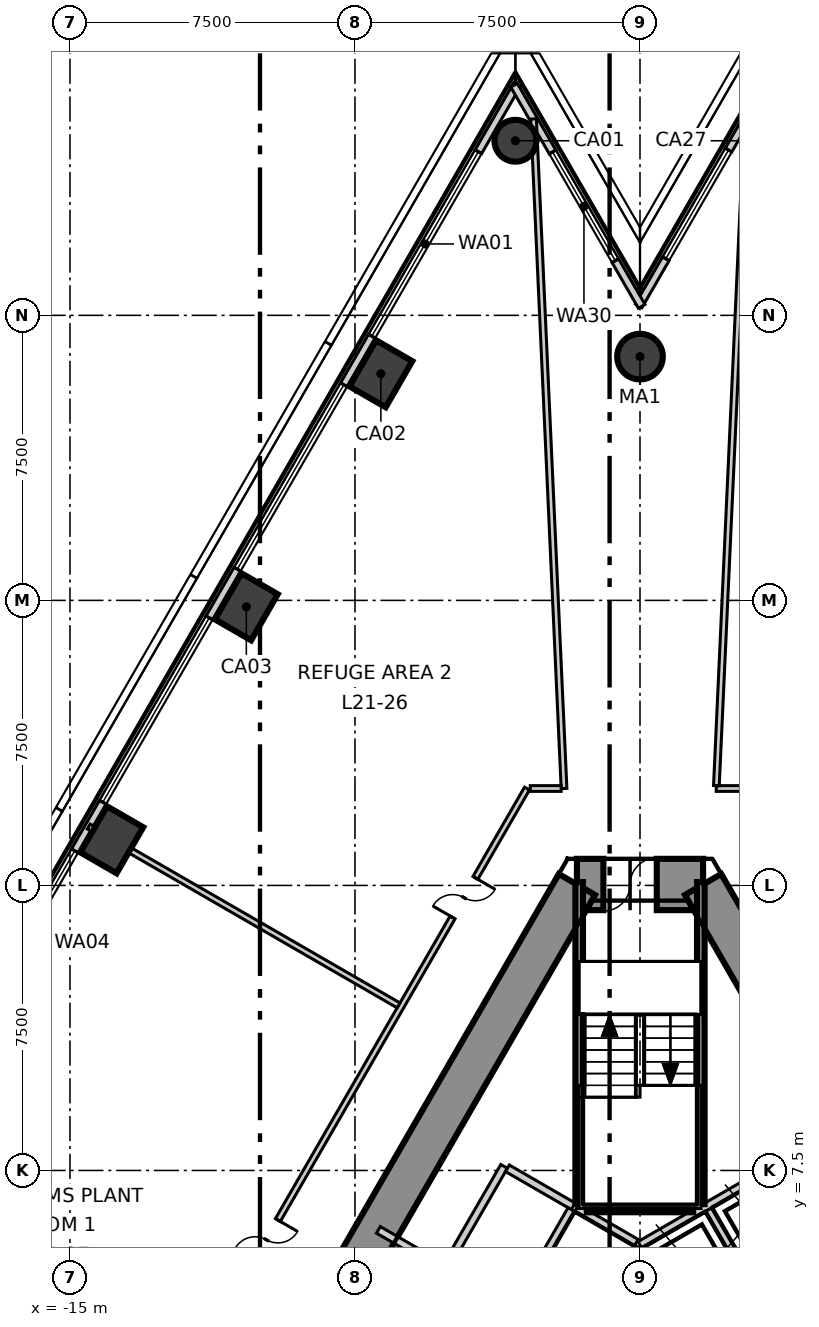
"""IFC4 building model, lengths in metres.
Left out: names, types, materials, properties, quantities, classifications, styles, units other than length and angle.
Written with IfcOpenShell. Run it as: python <this file> out.ifc"""

import sys

from ifc_helpers import new_model, si_unit, direction, frame, frame_2d, origin, origin_2d, place, context, subcontext, project, spatial, polyline, rectangle, circle, outline, extrude, element, fill, save


model = new_model("IFC4")
c1 = context("Model", 3, precision=1e-05, world=origin(), true_north=direction((0.0, 1.0)))
c2 = subcontext(c1, "Body", "Model", "MODEL_VIEW")
j1 = project(units=[si_unit("LENGTHUNIT", "METRE"), si_unit("PLANEANGLEUNIT", "RADIAN")], contexts=[c1])
p1 = place(None, origin())
s1 = spatial("IfcSite", under=j1, at=p1, CompositionType="ELEMENT")
p2 = place(p1, origin())
s2 = spatial("IfcBuilding", under=s1, at=p2, CompositionType="ELEMENT")
p3 = place(p2, frame((0.0, 0.0, 95.3)))
s3 = spatial("IfcBuildingStorey", under=s2, at=p3, CompositionType="ELEMENT", Elevation=95.3)
p4 = place(p3, frame((1.66, 15.025, -0.3), z_axis=(0.0, 0.0, 1.0), x_axis=(-1.0, 0.0, 0.0)))
e1 = element("IfcWall", 1, at=p4, inside=s3, PredefinedType="SHEAR", context=c2, shape_type="SweptSolid", body=[
    extrude(outline(polyline([(-0.245, -0.675), (1.66, -0.675), (3.565, -0.675), (3.075, 0.675), (1.66, 0.675), (0.245, 0.675), (-0.245, -0.675)])), origin(), (0.0, 0.0, 1.0), 4.2),
])
p5 = place(p4, frame((1.221, 0.0, 0.3)))
e2 = element("IfcOpeningElement", 2, at=p5, cuts=e1, PredefinedType="OPENING", context=c2, shape_type="SweptSolid", body=[
    extrude(rectangle(XDim=1.4, YDim=2.1, at=frame_2d((0.7, 1.05))), frame((0.0, 0.685, 0.0), z_axis=(0.0, -1.0, 0.0), x_axis=(1.0, 0.0, 0.0)), (0.0, 0.0, 1.0), 1.37),
])
p6 = place(p3, frame((-1.66, 15.025, -0.3), z_axis=(0.0, 0.0, 1.0), x_axis=(-0.500003780125, -0.866023221317, 0.0)))
e3 = element("IfcWall", 3, at=p6, inside=s3, PredefinedType="SHEAR", context=c2, shape_type="SweptSolid", body=[
    extrude(outline(polyline([(-0.462, -0.55), (1.483, -0.55), (3.428, -0.55), (5.374, -0.55), (7.319, -0.55), (9.264, -0.55), (11.209, -0.55), (13.155, -0.55), (15.1, -0.55), (17.045, -0.55), (18.99, -0.55), (20.936, -0.55), (22.881, -0.55), (24.826, -0.55), (23.902, 0.55), (21.949, 0.55), (19.995, 0.55), (18.042, 0.55), (16.089, 0.55), (14.135, 0.55), (12.182, 0.55), (10.229, 0.55), (8.275, 0.55), (6.322, 0.55), (4.369, 0.55), (2.415, 0.55), (0.462, 0.55), (-0.462, -0.55)])), origin(), (0.0, 0.0, 1.0), 4.2),
])
p7 = place(p6, frame((11.776, 0.0, 0.3)))
e4 = element("IfcOpeningElement", 4, at=p7, cuts=e3, PredefinedType="OPENING", context=c2, shape_type="SweptSolid", body=[
    extrude(rectangle(XDim=1.1, YDim=2.1, at=frame_2d((0.55, 1.05))), frame((0.0, 0.56, 0.0), z_axis=(0.0, -1.0, 0.0), x_axis=(1.0, 0.0, 0.0)), (0.0, 0.0, 1.0), 1.12),
])
p8 = place(p3, frame((13.842, -6.075, -0.3), z_axis=(0.0, 0.0, 1.0), x_axis=(-0.500003780125, 0.866023221317, 0.0)))
e5 = element("IfcWall", 5, at=p8, inside=s3, PredefinedType="SHEAR", context=c2, shape_type="SweptSolid", body=[
    extrude(outline(polyline([(-0.462, -0.55), (1.483, -0.55), (3.428, -0.55), (5.374, -0.55), (7.319, -0.55), (9.264, -0.55), (11.209, -0.55), (13.155, -0.55), (15.1, -0.55), (17.045, -0.55), (18.99, -0.55), (20.936, -0.55), (22.881, -0.55), (24.826, -0.55), (23.902, 0.55), (21.949, 0.55), (19.995, 0.55), (18.042, 0.55), (16.089, 0.55), (14.135, 0.55), (12.182, 0.55), (10.229, 0.55), (8.275, 0.55), (6.322, 0.55), (4.369, 0.55), (2.415, 0.55), (0.462, 0.55), (-0.462, -0.55)])), origin(), (0.0, 0.0, 1.0), 4.2),
])
p9 = place(p8, frame((11.426, 0.0, 0.3)))
e6 = element("IfcOpeningElement", 6, at=p9, cuts=e5, PredefinedType="OPENING", context=c2, shape_type="SweptSolid", body=[
    extrude(rectangle(XDim=1.8, YDim=2.1, at=frame_2d((0.9, 1.05))), frame((0.0, 0.56, 0.0), z_axis=(0.0, -1.0, 0.0), x_axis=(1.0, 0.0, 0.0)), (0.0, 0.0, 1.0), 1.12),
])
p10 = place(p3, frame((-3.279, 34.594, -0.3), z_axis=(0.0, 0.0, 1.0), x_axis=(0.5, 0.866025403784, 0.0)))
e7 = element("IfcColumn", 7, at=p10, inside=s3, PredefinedType="COLUMN", context=c2, shape_type="SweptSolid", body=[
    extrude(circle(Radius=0.55, at=origin_2d()), origin(), (0.0, 0.0, 1.0), 4.2),
])
for number, where, z_axis, x_axis in (
    (8, (-6.819, 28.463, -0.3), (0.0, 0.0, 1.0), (0.5, 0.866, 0.0)),
    (9, (-10.359, 22.331, -0.3), (0.0, 0.0, 1.0), (0.5, 0.866, 0.0)),
    (10, (-13.899, 16.2, -0.3), (0.0, 0.0, 1.0), (0.5, 0.866, 0.0)),
):
    element("IfcColumn", number, at=place(p3, frame(where, z_axis=z_axis, x_axis=x_axis)), inside=s3, PredefinedType="COLUMN", context=c2, shape_type="SweptSolid", body=[
        extrude(rectangle(XDim=1.4, YDim=1.1, at=origin_2d()), origin(), (0.0, 0.0, 1.0), 4.2),
    ])
p11 = place(p3, frame((0.0, 28.914, -0.3), z_axis=(0.0, 0.0, 1.0), x_axis=(1.0, 0.0, 0.0)))
e11 = element("IfcColumn", 11, at=p11, inside=s3, PredefinedType="COLUMN", context=c2, shape_type="SweptSolid", body=[
    extrude(circle(Radius=0.6, at=origin_2d()), origin(), (0.0, 0.0, 1.0), 4.2),
])
p12 = place(p3, frame((-3.234, 36.072, 0.0), z_axis=(0.0, 0.0, 1.0), x_axis=(-0.500009108245, -0.866020145073, 0.0)))
e12 = element("IfcWall", 12, at=p12, inside=s3, PredefinedType="ELEMENTEDWALL", context=c2, shape_type="SweptSolid", body=[
    extrude(rectangle(XDim=59.225, YDim=0.2, at=frame_2d((29.613, 0.0))), origin(), (0.0, 0.0, 1.0), 3.9),
])
p13 = place(p12, frame((2.042, 0.0, 0.9)))
e13 = element("IfcOpeningElement", 13, at=p13, cuts=e12, PredefinedType="OPENING", context=c2, shape_type="SweptSolid", body=[
    extrude(rectangle(XDim=5.6, YDim=2.5, at=frame_2d((2.8, 1.25))), frame((0.0, 0.11, 0.0), z_axis=(0.0, -1.0, 0.0), x_axis=(1.0, 0.0, 0.0)), (0.0, 0.0, 1.0), 0.22),
])
p14 = place(p12, frame((9.122, 0.0, 0.9)))
e14 = element("IfcOpeningElement", 14, at=p14, cuts=e12, PredefinedType="OPENING", context=c2, shape_type="SweptSolid", body=[
    extrude(rectangle(XDim=5.6, YDim=2.5, at=frame_2d((2.8, 1.25))), frame((0.0, 0.11, 0.0), z_axis=(0.0, -1.0, 0.0), x_axis=(1.0, 0.0, 0.0)), (0.0, 0.0, 1.0), 0.22),
])
p15 = place(p12, frame((16.202, 0.0, 0.9)))
e15 = element("IfcOpeningElement", 15, at=p15, cuts=e12, PredefinedType="OPENING", context=c2, shape_type="SweptSolid", body=[
    extrude(rectangle(XDim=5.6, YDim=2.5, at=frame_2d((2.8, 1.25))), frame((0.0, 0.11, 0.0), z_axis=(0.0, -1.0, 0.0), x_axis=(1.0, 0.0, 0.0)), (0.0, 0.0, 1.0), 0.22),
])
p16 = place(p12, frame((23.282, 0.0, 0.9)))
e16 = element("IfcOpeningElement", 16, at=p16, cuts=e12, PredefinedType="OPENING", context=c2, shape_type="SweptSolid", body=[
    extrude(rectangle(XDim=5.6, YDim=2.5, at=frame_2d((2.8, 1.25))), frame((0.0, 0.11, 0.0), z_axis=(0.0, -1.0, 0.0), x_axis=(1.0, 0.0, 0.0)), (0.0, 0.0, 1.0), 0.22),
])
p17 = place(p12, frame((30.362, 0.0, 0.9)))
e17 = element("IfcOpeningElement", 17, at=p17, cuts=e12, PredefinedType="OPENING", context=c2, shape_type="SweptSolid", body=[
    extrude(rectangle(XDim=5.6, YDim=2.5, at=frame_2d((2.8, 1.25))), frame((0.0, 0.11, 0.0), z_axis=(0.0, -1.0, 0.0), x_axis=(1.0, 0.0, 0.0)), (0.0, 0.0, 1.0), 0.22),
])
p18 = place(p12, frame((37.442, 0.0, 0.9)))
e18 = element("IfcOpeningElement", 18, at=p18, cuts=e12, PredefinedType="OPENING", context=c2, shape_type="SweptSolid", body=[
    extrude(rectangle(XDim=5.6, YDim=2.5, at=frame_2d((2.8, 1.25))), frame((0.0, 0.11, 0.0), z_axis=(0.0, -1.0, 0.0), x_axis=(1.0, 0.0, 0.0)), (0.0, 0.0, 1.0), 0.22),
])
p19 = place(p12, frame((44.522, 0.0, 0.9)))
e19 = element("IfcOpeningElement", 19, at=p19, cuts=e12, PredefinedType="OPENING", context=c2, shape_type="SweptSolid", body=[
    extrude(rectangle(XDim=5.6, YDim=2.5, at=frame_2d((2.8, 1.25))), frame((0.0, 0.11, 0.0), z_axis=(0.0, -1.0, 0.0), x_axis=(1.0, 0.0, 0.0)), (0.0, 0.0, 1.0), 0.22),
])
p20 = place(p12, frame((51.602, 0.0, 0.9)))
e20 = element("IfcOpeningElement", 20, at=p20, cuts=e12, PredefinedType="OPENING", context=c2, shape_type="SweptSolid", body=[
    extrude(rectangle(XDim=5.6, YDim=2.5, at=frame_2d((2.8, 1.25))), frame((0.0, 0.11, 0.0), z_axis=(0.0, -1.0, 0.0), x_axis=(1.0, 0.0, 0.0)), (0.0, 0.0, 1.0), 0.22),
])
p21 = place(p3, frame((3.324, 36.072, 0.0), z_axis=(0.0, 0.0, 1.0), x_axis=(-0.499914325741, -0.866074862191, 0.0)))
e21 = element("IfcWall", 21, at=p21, inside=s3, PredefinedType="ELEMENTEDWALL", context=c2, shape_type="SweptSolid", body=[
    extrude(rectangle(XDim=6.719, YDim=0.2, at=frame_2d((3.359, 0.0))), origin(), (0.0, 0.0, 1.0), 3.9),
])
p22 = place(p21, frame((1.99, 0.0, 0.9)))
e22 = element("IfcOpeningElement", 22, at=p22, cuts=e21, PredefinedType="OPENING", context=c2, shape_type="SweptSolid", body=[
    extrude(rectangle(XDim=3.3, YDim=2.5, at=frame_2d((1.65, 1.25))), frame((0.0, 0.11, 0.0), z_axis=(0.0, -1.0, 0.0), x_axis=(1.0, 0.0, 0.0)), (0.0, 0.0, 1.0), 0.22),
])
p23 = place(p3, frame((0.045, 30.236, 0.0), z_axis=(0.0, 0.0, 1.0), x_axis=(-0.49993005842, 0.866065780809, 0.0)))
e23 = element("IfcWall", 23, at=p23, inside=s3, PredefinedType="ELEMENTEDWALL", context=c2, shape_type="SweptSolid", body=[
    extrude(rectangle(XDim=6.719, YDim=0.2, at=frame_2d((3.359, 0.0))), origin(), (0.0, 0.0, 1.0), 3.9),
])
p24 = place(p23, frame((1.39, 0.0, 0.9)))
e24 = element("IfcOpeningElement", 24, at=p24, cuts=e23, PredefinedType="OPENING", context=c2, shape_type="SweptSolid", body=[
    extrude(rectangle(XDim=3.3, YDim=2.5, at=frame_2d((1.65, 1.25))), frame((0.0, 0.11, 0.0), z_axis=(0.0, -1.0, 0.0), x_axis=(1.0, 0.0, 0.0)), (0.0, 0.0, 1.0), 0.22),
])
p25 = place(p3, frame((-16.685, -6.2, 0.0), z_axis=(0.0, 0.0, 1.0), x_axis=(0.500002442456, 0.866023993627, 0.0)))
e25 = element("IfcWall", 25, at=p25, inside=s3, PredefinedType="PARTITIONING", context=c2, shape_type="SweptSolid", body=[
    extrude(rectangle(XDim=27.424, YDim=0.15, at=frame_2d((13.712, 0.0))), origin(), (0.0, 0.0, 1.0), 3.9),
])
p26 = place(p25, frame((23.508, 0.0, 0.0)))
e26 = element("IfcOpeningElement", 26, at=p26, cuts=e25, PredefinedType="OPENING", context=c2, shape_type="SweptSolid", body=[
    extrude(rectangle(XDim=1.2, YDim=2.1, at=frame_2d((0.6, 1.05))), frame((0.0, 0.085, 0.0), z_axis=(0.0, -1.0, 0.0), x_axis=(1.0, 0.0, 0.0)), (0.0, 0.0, 1.0), 0.17),
])
p27 = place(p25, frame((13.112, 0.0, 0.0)))
e27 = element("IfcOpeningElement", 27, at=p27, cuts=e25, PredefinedType="OPENING", context=c2, shape_type="SweptSolid", body=[
    extrude(rectangle(XDim=1.2, YDim=2.1, at=frame_2d((0.6, 1.05))), frame((0.0, 0.085, 0.0), z_axis=(0.0, -1.0, 0.0), x_axis=(1.0, 0.0, 0.0)), (0.0, 0.0, 1.0), 0.17),
])
p28 = place(p25, frame((2.716, 0.0, 0.0)))
e28 = element("IfcOpeningElement", 28, at=p28, cuts=e25, PredefinedType="OPENING", context=c2, shape_type="SweptSolid", body=[
    extrude(rectangle(XDim=1.2, YDim=2.1, at=frame_2d((0.6, 1.05))), frame((0.0, 0.085, 0.0), z_axis=(0.0, -1.0, 0.0), x_axis=(1.0, 0.0, 0.0)), (0.0, 0.0, 1.0), 0.17),
])
p29 = place(p3, frame((-14.505, 16.55, 0.0), z_axis=(0.0, 0.0, 1.0), x_axis=(0.866018845103, -0.500011359798, 0.0)))
e29 = element("IfcWall", 29, at=p29, inside=s3, PredefinedType="PARTITIONING", context=c2, shape_type="SweptSolid", body=[
    extrude(rectangle(XDim=9.412, YDim=0.15, at=frame_2d((4.706, 0.0))), origin(), (0.0, 0.0, 1.0), 3.9),
])
p30 = place(p3, frame((-2.802, 35.168, 0.0), z_axis=(0.0, 0.0, 1.0), x_axis=(0.045530108202, -0.998962966905, 0.0)))
e30 = element("IfcWall", 30, at=p30, inside=s3, PredefinedType="PARTITIONING", context=c2, shape_type="SweptSolid", body=[
    extrude(rectangle(XDim=17.636, YDim=0.15, at=frame_2d((8.818, 0.0))), origin(), (0.0, 0.0, 1.0), 3.1),
])
p31 = place(p3, frame((-2.887, 17.55, 0.0), z_axis=(0.0, 0.0, 1.0), x_axis=(1.0, 0.0, 0.0)))
e31 = element("IfcWall", 31, at=p31, inside=s3, PredefinedType="PARTITIONING", context=c2, shape_type="SweptSolid", body=[
    extrude(rectangle(XDim=0.813, YDim=0.15, at=frame_2d((0.406, 0.0))), origin(), (0.0, 0.0, 1.0), 3.9),
])
p32 = place(p3, frame((2.006, 17.55, 0.0), z_axis=(0.0, 0.0, 1.0), x_axis=(1.0, 0.0, 0.0)))
e32 = element("IfcWall", 32, at=p32, inside=s3, PredefinedType="PARTITIONING", context=c2, shape_type="SweptSolid", body=[
    extrude(rectangle(XDim=0.967, YDim=0.15, at=frame_2d((0.483, 0.0))), origin(), (0.0, 0.0, 1.0), 3.9),
])
p33 = place(p3, frame((2.01, 17.625, 0.0), z_axis=(0.0, 0.0, 1.0), x_axis=(0.045880565482, 0.99894693238, 0.0)))
e33 = element("IfcWall", 33, at=p33, inside=s3, PredefinedType="PARTITIONING", context=c2, shape_type="SweptSolid", body=[
    extrude(rectangle(XDim=17.587, YDim=0.15, at=frame_2d((8.793, 0.0))), origin(), (0.0, 0.0, 1.0), 3.1),
])
p34 = place(p3, frame((-0.002, 5.541, 0.0), z_axis=(0.0, 0.0, 1.0), x_axis=(0.86600155993, 0.500041296494, 0.0)))
e34 = element("IfcWall", 34, at=p34, inside=s3, PredefinedType="SOLIDWALL", context=c2, shape_type="SweptSolid", body=[
    extrude(rectangle(XDim=4.132, YDim=0.2, at=frame_2d((2.066, 0.0))), origin(), (0.0, 0.0, 1.0), 3.9),
])
p35 = place(p3, frame((1.578, 2.874, 0.0), z_axis=(0.0, 0.0, 1.0), x_axis=(0.866062167127, 0.499936318615, 0.0)))
e35 = element("IfcWall", 35, at=p35, inside=s3, PredefinedType="SOLIDWALL", context=c2, shape_type="SweptSolid", body=[
    extrude(rectangle(XDim=6.127, YDim=0.2, at=frame_2d((3.063, 0.0))), origin(), (0.0, 0.0, 1.0), 3.9),
])
p36 = place(p35, frame((2.496, 0.0, 0.0)))
e36 = element("IfcOpeningElement", 36, at=p36, cuts=e35, PredefinedType="OPENING", context=c2, shape_type="SweptSolid", body=[
    extrude(rectangle(XDim=1.1, YDim=2.1, at=frame_2d((0.55, 1.05))), frame((0.0, 0.11, 0.0), z_axis=(0.0, -1.0, 0.0), x_axis=(1.0, 0.0, 0.0)), (0.0, 0.0, 1.0), 0.22),
])
p37 = place(p35, frame((4.671, 0.0, 0.0)))
e37 = element("IfcOpeningElement", 37, at=p37, cuts=e35, PredefinedType="OPENING", context=c2, shape_type="SweptSolid", body=[
    extrude(rectangle(XDim=0.9, YDim=2.1, at=frame_2d((0.45, 1.05))), frame((0.0, 0.11, 0.0), z_axis=(0.0, -1.0, 0.0), x_axis=(1.0, 0.0, 0.0)), (0.0, 0.0, 1.0), 0.22),
])
p38 = place(p3, frame((1.807, 6.47, 0.0), z_axis=(0.0, 0.0, 1.0), x_axis=(0.50012328804, -0.865954211699, 0.0)))
e38 = element("IfcWall", 38, at=p38, inside=s3, PredefinedType="SOLIDWALL", context=c2, shape_type="SweptSolid", body=[
    extrude(rectangle(XDim=2.9, YDim=0.2, at=frame_2d((1.45, 0.0))), origin(), (0.0, 0.0, 1.0), 3.9),
])
p39 = place(p3, frame((-6.884, 5.937, 0.0), z_axis=(0.0, 0.0, 1.0), x_axis=(0.866075409494, -0.499913377567, 0.0)))
e39 = element("IfcWall", 39, at=p39, inside=s3, PredefinedType="SOLIDWALL", context=c2, shape_type="SweptSolid", body=[
    extrude(rectangle(XDim=4.133, YDim=0.2, at=frame_2d((2.066, 0.0))), origin(), (0.0, 0.0, 1.0), 3.9),
])
p40 = place(p39, frame((2.63, 0.0, 0.0)))
e40 = element("IfcOpeningElement", 40, at=p40, cuts=e39, PredefinedType="OPENING", context=c2, shape_type="SweptSolid", body=[
    extrude(rectangle(XDim=0.9, YDim=2.1, at=frame_2d((0.45, 1.05))), frame((0.0, 0.11, 0.0), z_axis=(0.0, -1.0, 0.0), x_axis=(1.0, 0.0, 0.0)), (0.0, 0.0, 1.0), 0.22),
])
p41 = place(p3, frame((-5.076, 5.009, 0.0), z_axis=(0.0, 0.0, 1.0), x_axis=(0.50002537861, 0.866010750942, 0.0)))
e41 = element("IfcWall", 41, at=p41, inside=s3, PredefinedType="SOLIDWALL", context=c2, shape_type="SweptSolid", body=[
    extrude(rectangle(XDim=3.0, YDim=0.2, at=frame_2d((1.5, 0.0))), origin(), (0.0, 0.0, 1.0), 3.9),
])
p42 = place(p3, frame((-3.489, 7.557, 0.0), z_axis=(0.0, 0.0, 1.0), x_axis=(0.866010750942, -0.50002537861, 0.0)))
e42 = element("IfcWall", 42, at=p42, inside=s3, PredefinedType="SOLIDWALL", context=c2, shape_type="SweptSolid", body=[
    extrude(rectangle(XDim=2.0, YDim=0.2, at=frame_2d((1.0, 0.0))), origin(), (0.0, 0.0, 1.0), 3.9),
])
p43 = place(p3, frame((-3.257, 3.959, 0.0), z_axis=(0.0, 0.0, 1.0), x_axis=(0.50012328804, 0.865954211699, 0.0)))
e43 = element("IfcWall", 43, at=p43, inside=s3, PredefinedType="SOLIDWALL", context=c2, shape_type="SweptSolid", body=[
    extrude(rectangle(XDim=2.9, YDim=0.2, at=frame_2d((1.45, 0.0))), origin(), (0.0, 0.0, 1.0), 3.9),
])
p44 = place(p3, frame((-1.67, 6.507, 0.0), z_axis=(0.0, 0.0, 1.0), x_axis=(0.865941441609, -0.500145398563, 0.0)))
e44 = element("IfcWall", 44, at=p44, inside=s3, PredefinedType="SOLIDWALL", context=c2, shape_type="SweptSolid", body=[
    extrude(rectangle(XDim=1.815, YDim=0.2, at=frame_2d((0.908, 0.0))), origin(), (0.0, 0.0, 1.0), 3.9),
])
p45 = place(p3, frame((1.6, 6.615, 0.0), z_axis=(0.0, 0.0, 1.0), x_axis=(0.0, 1.0, 0.0)))
e45 = element("IfcWall", 45, at=p45, inside=s3, PredefinedType="SOLIDWALL", context=c2, shape_type="SweptSolid", body=[
    extrude(rectangle(XDim=8.474, YDim=0.2, at=frame_2d((4.237, 0.0))), origin(), (0.0, 0.0, 1.0), 3.9),
])
p46 = place(p3, frame((-1.4, 6.5, 0.0), z_axis=(0.0, 0.0, 1.0), x_axis=(1.0, 0.0, 0.0)))
e46 = element("IfcWall", 46, at=p46, inside=s3, PredefinedType="SOLIDWALL", context=c2, shape_type="SweptSolid", body=[
    extrude(rectangle(XDim=2.8, YDim=0.2, at=frame_2d((1.4, 0.0))), origin(), (0.0, 0.0, 1.0), 3.9),
])
p47 = place(p3, frame((-1.6, 6.615, 0.0), z_axis=(0.0, 0.0, 1.0), x_axis=(0.0, 1.0, 0.0)))
e47 = element("IfcWall", 47, at=p47, inside=s3, PredefinedType="SOLIDWALL", context=c2, shape_type="SweptSolid", body=[
    extrude(rectangle(XDim=8.474, YDim=0.2, at=frame_2d((4.237, 0.0))), origin(), (0.0, 0.0, 1.0), 3.9),
])
p48 = place(p13, origin())
e48 = element("IfcWindow", 48, at=p48, inside=s3, PartitioningType="SINGLE_PANEL", PredefinedType="WINDOW", context=c2, shape_type="SweptSolid", body=[
    extrude(rectangle(XDim=5.6, YDim=2.5, at=frame_2d((2.8, 1.25))), frame((0.0, 0.03, 0.0), z_axis=(0.0, -1.0, 0.0), x_axis=(1.0, 0.0, 0.0)), (0.0, 0.0, 1.0), 0.06),
])
fill(e13, e48)
p49 = place(p14, origin())
e49 = element("IfcWindow", 49, at=p49, inside=s3, PartitioningType="SINGLE_PANEL", PredefinedType="WINDOW", context=c2, shape_type="SweptSolid", body=[
    extrude(rectangle(XDim=5.6, YDim=2.5, at=frame_2d((2.8, 1.25))), frame((0.0, 0.03, 0.0), z_axis=(0.0, -1.0, 0.0), x_axis=(1.0, 0.0, 0.0)), (0.0, 0.0, 1.0), 0.06),
])
fill(e14, e49)
p50 = place(p15, origin())
e50 = element("IfcWindow", 50, at=p50, inside=s3, PartitioningType="SINGLE_PANEL", PredefinedType="WINDOW", context=c2, shape_type="SweptSolid", body=[
    extrude(rectangle(XDim=5.6, YDim=2.5, at=frame_2d((2.8, 1.25))), frame((0.0, 0.03, 0.0), z_axis=(0.0, -1.0, 0.0), x_axis=(1.0, 0.0, 0.0)), (0.0, 0.0, 1.0), 0.06),
])
fill(e15, e50)
p51 = place(p16, origin())
e51 = element("IfcWindow", 51, at=p51, inside=s3, PartitioningType="SINGLE_PANEL", PredefinedType="WINDOW", context=c2, shape_type="SweptSolid", body=[
    extrude(rectangle(XDim=5.6, YDim=2.5, at=frame_2d((2.8, 1.25))), frame((0.0, 0.03, 0.0), z_axis=(0.0, -1.0, 0.0), x_axis=(1.0, 0.0, 0.0)), (0.0, 0.0, 1.0), 0.06),
])
fill(e16, e51)
p52 = place(p22, origin())
e52 = element("IfcWindow", 52, at=p52, inside=s3, PartitioningType="SINGLE_PANEL", PredefinedType="WINDOW", context=c2, shape_type="SweptSolid", body=[
    extrude(rectangle(XDim=3.3, YDim=2.5, at=frame_2d((1.65, 1.25))), frame((0.0, 0.03, 0.0), z_axis=(0.0, -1.0, 0.0), x_axis=(1.0, 0.0, 0.0)), (0.0, 0.0, 1.0), 0.06),
])
fill(e22, e52)
p53 = place(p24, origin())
e53 = element("IfcWindow", 53, at=p53, inside=s3, PartitioningType="SINGLE_PANEL", PredefinedType="WINDOW", context=c2, shape_type="SweptSolid", body=[
    extrude(rectangle(XDim=3.3, YDim=2.5, at=frame_2d((1.65, 1.25))), frame((0.0, 0.03, 0.0), z_axis=(0.0, -1.0, 0.0), x_axis=(1.0, 0.0, 0.0)), (0.0, 0.0, 1.0), 0.06),
])
fill(e24, e53)
p54 = place(p26, origin())
e54 = element("IfcDoor", 54, at=p54, inside=s3, OperationType="DOUBLE_DOOR_SINGLE_SWING", PredefinedType="DOOR", context=c2, shape_type="SweptSolid", body=[
    extrude(rectangle(XDim=1.2, YDim=2.1, at=frame_2d((0.6, 1.05))), frame((0.0, 0.025, 0.0), z_axis=(0.0, -1.0, 0.0), x_axis=(1.0, 0.0, 0.0)), (0.0, 0.0, 1.0), 0.05),
])
fill(e26, e54)
p55 = place(p27, origin())
e55 = element("IfcDoor", 55, at=p55, inside=s3, OperationType="DOUBLE_DOOR_SINGLE_SWING", PredefinedType="DOOR", context=c2, shape_type="SweptSolid", body=[
    extrude(rectangle(XDim=1.2, YDim=2.1, at=frame_2d((0.6, 1.05))), frame((0.0, 0.025, 0.0), z_axis=(0.0, -1.0, 0.0), x_axis=(1.0, 0.0, 0.0)), (0.0, 0.0, 1.0), 0.05),
])
fill(e27, e55)
p56 = place(p5, origin())
e56 = element("IfcDoor", 56, at=p56, inside=s3, OperationType="DOUBLE_DOOR_SINGLE_SWING", PredefinedType="DOOR", context=c2, shape_type="SweptSolid", body=[
    extrude(rectangle(XDim=1.4, YDim=2.1, at=frame_2d((0.7, 1.05))), frame((0.0, 0.025, 0.0), z_axis=(0.0, -1.0, 0.0), x_axis=(1.0, 0.0, 0.0)), (0.0, 0.0, 1.0), 0.05),
])
fill(e2, e56)
save(model, sys.argv[1])
